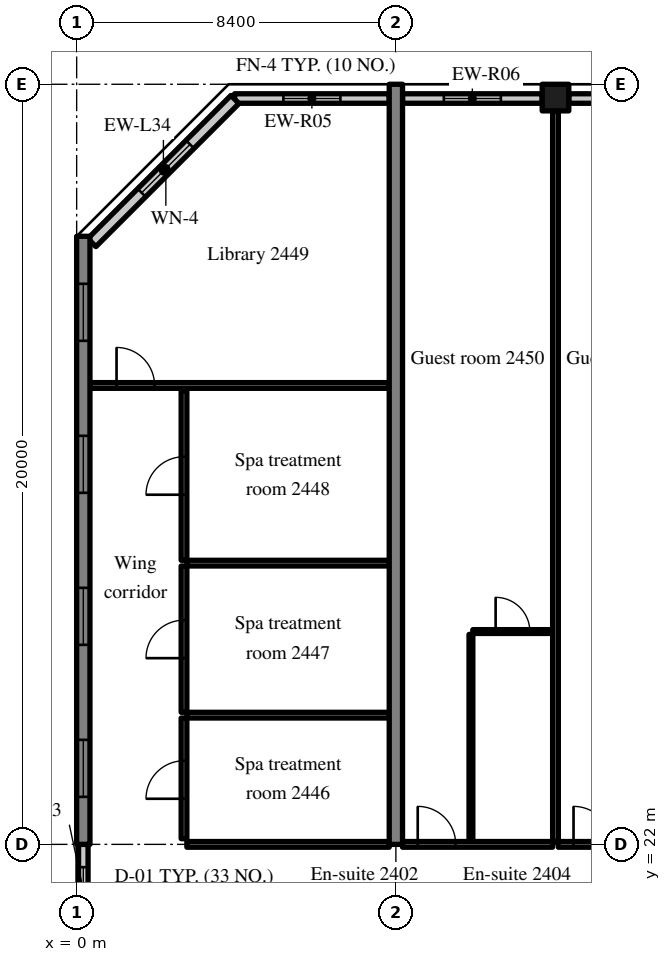
"""IFC4 building model, lengths in metres.
Left out: names, types, materials, properties, quantities, classifications, styles, units other than length and angle.
Written with IfcOpenShell. Run it as: python <this file> out.ifc"""

import sys

from ifc_helpers import new_model, si_unit, direction, frame, frame_2d, origin, origin_2d, place, context, subcontext, project, spatial, rectangle, extrude, source, transform, mapped, element, fill, save


model = new_model("IFC4")
c1 = context("Model", 3, precision=1e-05, world=origin(), true_north=direction((0.0, 1.0)))
c2 = subcontext(c1, "Body", "Model", "MODEL_VIEW")
j1 = project(units=[si_unit("LENGTHUNIT", "METRE"), si_unit("PLANEANGLEUNIT", "RADIAN")], contexts=[c1])
p1 = place(None, origin())
s1 = spatial("IfcSite", under=j1, at=p1, CompositionType="ELEMENT")
p2 = place(p1, origin())
s2 = spatial("IfcBuilding", under=s1, at=p2, CompositionType="ELEMENT")
p3 = place(p2, frame((0.0, 0.0, 102.8)))
s3 = spatial("IfcBuildingStorey", under=s2, at=p3, CompositionType="ELEMENT", Elevation=102.8)
m1 = source(origin(), c2, "Body", "SweptSolid", [
    extrude(rectangle(XDim=16.0, YDim=0.35, at=frame_2d((8.0, 0.0))), origin(), (0.0, 0.0, 1.0), 3.52),
])
p4 = place(p3, frame((0.175, 22.0, 0.0), z_axis=(0.0, 0.0, 1.0), x_axis=(0.0, 1.0, 0.0)))
e1 = element("IfcWall", 1, at=p4, inside=s3, PredefinedType="SHEAR", context=c2, shape_type="MappedRepresentation", body=[
    mapped(m1, transform((0.0, 0.0, 0.0), scale=1.0)),
])
m2 = source(origin(), c2, "Body", "SweptSolid", [
    extrude(rectangle(XDim=1.5, YDim=1.5, at=frame_2d((0.75, 0.75))), frame((0.0, 0.185, 0.0), z_axis=(0.0, -1.0, 0.0), x_axis=(1.0, 0.0, 0.0)), (0.0, 0.0, 1.0), 0.37),
])
p5 = place(p4, frame((1.25, 0.0, 0.9)))
e2 = element("IfcOpeningElement", 2, at=p5, cuts=e1, PredefinedType="OPENING", context=c2, shape_type="MappedRepresentation", body=[
    mapped(m2, transform((0.0, 0.0, 0.0), scale=1.0)),
])
p6 = place(p4, frame((5.25, 0.0, 0.9)))
e3 = element("IfcOpeningElement", 3, at=p6, cuts=e1, PredefinedType="OPENING", context=c2, shape_type="MappedRepresentation", body=[
    mapped(m2, transform((0.0, 0.0, 0.0), scale=1.0)),
])
p7 = place(p4, frame((9.25, 0.0, 0.9)))
e4 = element("IfcOpeningElement", 4, at=p7, cuts=e1, PredefinedType="OPENING", context=c2, shape_type="MappedRepresentation", body=[
    mapped(m2, transform((0.0, 0.0, 0.0), scale=1.0)),
])
p8 = place(p4, frame((13.25, 0.0, 0.9)))
e5 = element("IfcOpeningElement", 5, at=p8, cuts=e1, PredefinedType="OPENING", context=c2, shape_type="MappedRepresentation", body=[
    mapped(m2, transform((0.0, 0.0, 0.0), scale=1.0)),
])
m3 = source(origin(), c2, "Body", "SweptSolid", [
    extrude(rectangle(XDim=20.0, YDim=0.35, at=frame_2d((10.0, 0.0))), origin(), (0.0, 0.0, 1.0), 3.52),
])
p9 = place(p3, frame((8.4, 22.0, 0.0), z_axis=(0.0, 0.0, 1.0), x_axis=(0.0, 1.0, 0.0)))
e6 = element("IfcWall", 6, at=p9, inside=s3, PredefinedType="SHEAR", context=c2, shape_type="MappedRepresentation", body=[
    mapped(m3, transform((0.0, 0.0, 0.0), scale=1.0)),
])
m4 = source(origin(), c2, "Body", "SweptSolid", [
    extrude(rectangle(XDim=0.7, YDim=0.7, at=origin_2d()), origin(), (0.0, 0.0, 1.0), 3.52),
])
p10 = place(p3, frame((12.6, 41.65, 0.0), z_axis=(0.0, 0.0, 1.0), x_axis=(1.0, 0.0, 0.0)))
e7 = element("IfcColumn", 7, at=p10, inside=s3, PredefinedType="COLUMN", context=c2, shape_type="MappedRepresentation", body=[
    mapped(m4, transform((0.0, 0.0, 0.0), scale=1.0)),
])
m5 = source(origin(), c2, "Body", "SweptSolid", [
    extrude(rectangle(XDim=4.07, YDim=0.25, at=frame_2d((2.035, 0.0))), origin(), (0.0, 0.0, 1.0), 2.82),
])
p11 = place(p3, frame((8.225, 41.625, 0.0), z_axis=(0.0, 0.0, 1.0), x_axis=(-1.0, 0.0, 0.0)))
e8 = element("IfcWall", 8, at=p11, inside=s3, PredefinedType="SOLIDWALL", context=c2, shape_type="MappedRepresentation", body=[
    mapped(m5, transform((0.0, 0.0, 0.0), scale=1.0)),
])
m6 = source(origin(), c2, "Body", "SweptSolid", [
    extrude(rectangle(XDim=1.5, YDim=1.5, at=frame_2d((0.75, 0.75))), frame((0.0, 0.135, 0.0), z_axis=(0.0, -1.0, 0.0), x_axis=(1.0, 0.0, 0.0)), (0.0, 0.0, 1.0), 0.27),
])
p12 = place(p11, frame((1.285, 0.0, 0.9)))
e9 = element("IfcOpeningElement", 9, at=p12, cuts=e8, PredefinedType="OPENING", context=c2, shape_type="MappedRepresentation", body=[
    mapped(m6, transform((0.0, 0.0, 0.0), scale=1.0)),
])
m7 = source(origin(), c2, "Body", "SweptSolid", [
    extrude(rectangle(XDim=3.675, YDim=0.25, at=frame_2d((1.837, 0.0))), origin(), (0.0, 0.0, 1.0), 2.82),
])
p13 = place(p3, frame((12.25, 41.625, 0.0), z_axis=(0.0, 0.0, 1.0), x_axis=(-1.0, 0.0, 0.0)))
e10 = element("IfcWall", 10, at=p13, inside=s3, PredefinedType="SOLIDWALL", context=c2, shape_type="MappedRepresentation", body=[
    mapped(m7, transform((0.0, 0.0, 0.0), scale=1.0)),
])
p14 = place(p13, frame((1.087, 0.0, 0.9)))
e11 = element("IfcOpeningElement", 11, at=p14, cuts=e10, PredefinedType="OPENING", context=c2, shape_type="MappedRepresentation", body=[
    mapped(m6, transform((0.0, 0.0, 0.0), scale=1.0)),
])
p15 = place(p3, frame((16.625, 41.625, 0.0), z_axis=(0.0, 0.0, 1.0), x_axis=(-1.0, 0.0, 0.0)))
e12 = element("IfcWall", 12, at=p15, inside=s3, PredefinedType="SOLIDWALL", context=c2, shape_type="MappedRepresentation", body=[
    mapped(m7, transform((0.0, 0.0, 0.0), scale=1.0)),
])
p16 = place(p15, frame((1.087, 0.0, 0.9)))
e13 = element("IfcOpeningElement", 13, at=p16, cuts=e12, PredefinedType="OPENING", context=c2, shape_type="MappedRepresentation", body=[
    mapped(m6, transform((0.0, 0.0, 0.0), scale=1.0)),
])
m8 = source(origin(), c2, "Body", "SweptSolid", [
    extrude(rectangle(XDim=5.326, YDim=0.3, at=frame_2d((2.663, 0.0))), origin(), (0.0, 0.0, 1.0), 3.52),
])
p17 = place(p3, frame((4.166, 41.6, 0.0), z_axis=(0.0, 0.0, 1.0), x_axis=(-0.707106781187, -0.707106781187, 0.0)))
e14 = element("IfcWall", 14, at=p17, inside=s3, PredefinedType="SOLIDWALL", context=c2, shape_type="MappedRepresentation", body=[
    mapped(m8, transform((0.0, 0.0, 0.0), scale=1.0)),
])
m9 = source(origin(), c2, "Body", "SweptSolid", [
    extrude(rectangle(XDim=1.8, YDim=1.5, at=frame_2d((0.9, 0.75))), frame((0.0, 0.16, 0.0), z_axis=(0.0, -1.0, 0.0), x_axis=(1.0, 0.0, 0.0)), (0.0, 0.0, 1.0), 0.32),
])
p18 = place(p17, frame((1.672, 0.0, 0.9)))
e15 = element("IfcOpeningElement", 15, at=p18, cuts=e14, PredefinedType="OPENING", context=c2, shape_type="MappedRepresentation", body=[
    mapped(m9, transform((0.0, 0.0, 0.0), scale=1.0)),
])
m10 = source(origin(), c2, "Body", "SweptSolid", [
    extrude(rectangle(XDim=2.4, YDim=0.25, at=frame_2d((1.2, 0.0))), origin(), (0.0, 0.0, 1.0), 2.62),
])
p19 = place(p3, frame((0.175, 19.6, 0.0), z_axis=(0.0, 0.0, 1.0), x_axis=(0.0, 1.0, 0.0)))
e16 = element("IfcWall", 16, at=p19, inside=s3, PredefinedType="SOLIDWALL", context=c2, shape_type="MappedRepresentation", body=[
    mapped(m10, transform((0.0, 0.0, 0.0), scale=1.0)),
])
m11 = source(origin(), c2, "Body", "SweptSolid", [
    extrude(rectangle(XDim=1.2, YDim=1.5, at=frame_2d((0.6, 0.75))), frame((0.0, 0.135, 0.0), z_axis=(0.0, -1.0, 0.0), x_axis=(1.0, 0.0, 0.0)), (0.0, 0.0, 1.0), 0.27),
])
p20 = place(p19, frame((0.6, 0.0, 0.9)))
e17 = element("IfcOpeningElement", 17, at=p20, cuts=e16, PredefinedType="OPENING", context=c2, shape_type="MappedRepresentation", body=[
    mapped(m11, transform((0.0, 0.0, 0.0), scale=1.0)),
])
m12 = source(origin(), c2, "Body", "SweptSolid", [
    extrude(rectangle(XDim=5.325, YDim=0.15, at=frame_2d((2.663, 0.0))), origin(), (0.0, 0.0, 1.0), 2.82),
])
p21 = place(p3, frame((2.9, 22.0, 0.0), z_axis=(0.0, 0.0, 1.0), x_axis=(1.0, 0.0, 0.0)))
e18 = element("IfcWall", 18, at=p21, inside=s3, PredefinedType="PARTITIONING", context=c2, shape_type="MappedRepresentation", body=[
    mapped(m12, transform((0.0, 0.0, 0.0), scale=1.0)),
])
m13 = source(origin(), c2, "Body", "SweptSolid", [
    extrude(rectangle(XDim=3.175, YDim=0.15, at=frame_2d((1.587, 0.0))), origin(), (0.0, 0.0, 1.0), 3.52),
])
p22 = place(p3, frame((2.825, 22.15, 0.0), z_axis=(0.0, 0.0, 1.0), x_axis=(0.0, 1.0, 0.0)))
e19 = element("IfcWall", 19, at=p22, inside=s3, PredefinedType="PARTITIONING", context=c2, shape_type="MappedRepresentation", body=[
    mapped(m13, transform((0.0, 0.0, 0.0), scale=1.0)),
])
m14 = source(origin(), c2, "Body", "SweptSolid", [
    extrude(rectangle(XDim=1.0, YDim=2.1, at=frame_2d((0.5, 1.05))), frame((0.0, 0.085, 0.0), z_axis=(0.0, -1.0, 0.0), x_axis=(1.0, 0.0, 0.0)), (0.0, 0.0, 1.0), 0.17),
])
p23 = place(p22, frame((1.05, 0.0, 0.0)))
e20 = element("IfcOpeningElement", 20, at=p23, cuts=e19, PredefinedType="OPENING", context=c2, shape_type="MappedRepresentation", body=[
    mapped(m14, transform((0.0, 0.0, 0.0), scale=1.0)),
])
m15 = source(origin(), c2, "Body", "SweptSolid", [
    extrude(rectangle(XDim=5.325, YDim=0.15, at=frame_2d((2.663, 0.0))), origin(), (0.0, 0.0, 1.0), 3.52),
])
p24 = place(p3, frame((2.9, 25.4, 0.0), z_axis=(0.0, 0.0, 1.0), x_axis=(1.0, 0.0, 0.0)))
e21 = element("IfcWall", 21, at=p24, inside=s3, PredefinedType="PARTITIONING", context=c2, shape_type="MappedRepresentation", body=[
    mapped(m15, transform((0.0, 0.0, 0.0), scale=1.0)),
])
m16 = source(origin(), c2, "Body", "SweptSolid", [
    extrude(rectangle(XDim=3.85, YDim=0.15, at=frame_2d((1.925, 0.0))), origin(), (0.0, 0.0, 1.0), 3.52),
])
p25 = place(p3, frame((2.825, 25.475, 0.0), z_axis=(0.0, 0.0, 1.0), x_axis=(0.0, 1.0, 0.0)))
e22 = element("IfcWall", 22, at=p25, inside=s3, PredefinedType="PARTITIONING", context=c2, shape_type="MappedRepresentation", body=[
    mapped(m16, transform((0.0, 0.0, 0.0), scale=1.0)),
])
p26 = place(p25, frame((1.425, 0.0, 0.0)))
e23 = element("IfcOpeningElement", 23, at=p26, cuts=e22, PredefinedType="OPENING", context=c2, shape_type="MappedRepresentation", body=[
    mapped(m14, transform((0.0, 0.0, 0.0), scale=1.0)),
])
p27 = place(p3, frame((2.9, 29.4, 0.0), z_axis=(0.0, 0.0, 1.0), x_axis=(1.0, 0.0, 0.0)))
e24 = element("IfcWall", 24, at=p27, inside=s3, PredefinedType="PARTITIONING", context=c2, shape_type="MappedRepresentation", body=[
    mapped(m15, transform((0.0, 0.0, 0.0), scale=1.0)),
])
m17 = source(origin(), c2, "Body", "SweptSolid", [
    extrude(rectangle(XDim=4.45, YDim=0.15, at=frame_2d((2.225, 0.0))), origin(), (0.0, 0.0, 1.0), 3.52),
])
p28 = place(p3, frame((2.825, 29.475, 0.0), z_axis=(0.0, 0.0, 1.0), x_axis=(0.0, 1.0, 0.0)))
e25 = element("IfcWall", 25, at=p28, inside=s3, PredefinedType="PARTITIONING", context=c2, shape_type="MappedRepresentation", body=[
    mapped(m17, transform((0.0, 0.0, 0.0), scale=1.0)),
])
p29 = place(p28, frame((1.725, 0.0, 0.0)))
e26 = element("IfcOpeningElement", 26, at=p29, cuts=e25, PredefinedType="OPENING", context=c2, shape_type="MappedRepresentation", body=[
    mapped(m14, transform((0.0, 0.0, 0.0), scale=1.0)),
])
m18 = source(origin(), c2, "Body", "SweptSolid", [
    extrude(rectangle(XDim=7.875, YDim=0.15, at=frame_2d((3.938, 0.0))), origin(), (0.0, 0.0, 1.0), 3.52),
])
p30 = place(p3, frame((0.35, 34.075, 0.0), z_axis=(0.0, 0.0, 1.0), x_axis=(1.0, 0.0, 0.0)))
e27 = element("IfcWall", 27, at=p30, inside=s3, PredefinedType="PARTITIONING", context=c2, shape_type="MappedRepresentation", body=[
    mapped(m18, transform((0.0, 0.0, 0.0), scale=1.0)),
])
p31 = place(p30, frame((0.7, 0.0, 0.0)))
e28 = element("IfcOpeningElement", 28, at=p31, cuts=e27, PredefinedType="OPENING", context=c2, shape_type="MappedRepresentation", body=[
    mapped(m14, transform((0.0, 0.0, 0.0), scale=1.0)),
])
m19 = source(origin(), c2, "Body", "SweptSolid", [
    extrude(rectangle(XDim=5.45, YDim=0.1, at=frame_2d((2.725, 0.0))), origin(), (0.0, 0.0, 1.0), 3.52),
])
p32 = place(p3, frame((10.375, 22.075, 0.0), z_axis=(0.0, 0.0, 1.0), x_axis=(0.0, 1.0, 0.0)))
e29 = element("IfcWall", 29, at=p32, inside=s3, PredefinedType="PARTITIONING", context=c2, shape_type="MappedRepresentation", body=[
    mapped(m19, transform((0.0, 0.0, 0.0), scale=1.0)),
])
m20 = source(origin(), c2, "Body", "SweptSolid", [
    extrude(rectangle(XDim=2.1, YDim=0.1, at=frame_2d((1.05, 0.0))), origin(), (0.0, 0.0, 1.0), 3.52),
])
p33 = place(p3, frame((10.425, 27.6, 0.0), z_axis=(0.0, 0.0, 1.0), x_axis=(1.0, 0.0, 0.0)))
e30 = element("IfcWall", 30, at=p33, inside=s3, PredefinedType="PARTITIONING", context=c2, shape_type="MappedRepresentation", body=[
    mapped(m20, transform((0.0, 0.0, 0.0), scale=1.0)),
])
m21 = source(origin(), c2, "Body", "SweptSolid", [
    extrude(rectangle(XDim=0.9, YDim=2.1, at=frame_2d((0.45, 1.05))), frame((0.0, 0.06, 0.0), z_axis=(0.0, -1.0, 0.0), x_axis=(1.0, 0.0, 0.0)), (0.0, 0.0, 1.0), 0.12),
])
p34 = place(p33, frame((0.6, 0.0, 0.0)))
e31 = element("IfcOpeningElement", 31, at=p34, cuts=e30, PredefinedType="OPENING", context=c2, shape_type="MappedRepresentation", body=[
    mapped(m21, transform((0.0, 0.0, 0.0), scale=1.0)),
])
m22 = source(origin(), c2, "Body", "SweptSolid", [
    extrude(rectangle(XDim=3.95, YDim=0.15, at=frame_2d((1.975, 0.0))), origin(), (0.0, 0.0, 1.0), 2.82),
])
p35 = place(p3, frame((8.575, 22.0, 0.0), z_axis=(0.0, 0.0, 1.0), x_axis=(1.0, 0.0, 0.0)))
e32 = element("IfcWall", 32, at=p35, inside=s3, PredefinedType="PARTITIONING", context=c2, shape_type="MappedRepresentation", body=[
    mapped(m22, transform((0.0, 0.0, 0.0), scale=1.0)),
])
p36 = place(p35, frame((0.4, 0.0, 0.0)))
e33 = element("IfcOpeningElement", 33, at=p36, cuts=e32, PredefinedType="OPENING", context=c2, shape_type="MappedRepresentation", body=[
    mapped(m14, transform((0.0, 0.0, 0.0), scale=1.0)),
])
p37 = place(p3, frame((12.675, 22.0, 0.0), z_axis=(0.0, 0.0, 1.0), x_axis=(1.0, 0.0, 0.0)))
e34 = element("IfcWall", 34, at=p37, inside=s3, PredefinedType="PARTITIONING", context=c2, shape_type="MappedRepresentation", body=[
    mapped(m22, transform((0.0, 0.0, 0.0), scale=1.0)),
])
p38 = place(p37, frame((0.4, 0.0, 0.0)))
e35 = element("IfcOpeningElement", 35, at=p38, cuts=e34, PredefinedType="OPENING", context=c2, shape_type="MappedRepresentation", body=[
    mapped(m14, transform((0.0, 0.0, 0.0), scale=1.0)),
])
m23 = source(origin(), c2, "Body", "SweptSolid", [
    extrude(rectangle(XDim=19.225, YDim=0.15, at=frame_2d((9.613, 0.0))), origin(), (0.0, 0.0, 1.0), 3.52),
])
p39 = place(p3, frame((12.6, 22.075, 0.0), z_axis=(0.0, 0.0, 1.0), x_axis=(0.0, 1.0, 0.0)))
e36 = element("IfcWall", 36, at=p39, inside=s3, PredefinedType="PARTITIONING", context=c2, shape_type="MappedRepresentation", body=[
    mapped(m23, transform((0.0, 0.0, 0.0), scale=1.0)),
])
m24 = source(origin(), c2, "Body", "SweptSolid", [
    extrude(rectangle(XDim=1.5, YDim=1.5, at=frame_2d((0.75, 0.75))), frame((0.0, 0.03, 0.0), z_axis=(0.0, -1.0, 0.0), x_axis=(1.0, 0.0, 0.0)), (0.0, 0.0, 1.0), 0.06),
])
p40 = place(p12, origin())
e37 = element("IfcWindow", 37, at=p40, inside=s3, PartitioningType="SINGLE_PANEL", PredefinedType="WINDOW", context=c2, shape_type="MappedRepresentation", body=[
    mapped(m24, transform((0.0, 0.0, 0.0), scale=1.0)),
])
fill(e9, e37)
p41 = place(p14, origin())
e38 = element("IfcWindow", 38, at=p41, inside=s3, PartitioningType="SINGLE_PANEL", PredefinedType="WINDOW", context=c2, shape_type="MappedRepresentation", body=[
    mapped(m24, transform((0.0, 0.0, 0.0), scale=1.0)),
])
fill(e11, e38)
m25 = source(origin(), c2, "Body", "SweptSolid", [
    extrude(rectangle(XDim=1.8, YDim=1.5, at=frame_2d((0.9, 0.75))), frame((0.0, 0.03, 0.0), z_axis=(0.0, -1.0, 0.0), x_axis=(1.0, 0.0, 0.0)), (0.0, 0.0, 1.0), 0.06),
])
p42 = place(p18, origin())
e39 = element("IfcWindow", 39, at=p42, inside=s3, PartitioningType="SINGLE_PANEL", PredefinedType="WINDOW", context=c2, shape_type="MappedRepresentation", body=[
    mapped(m25, transform((0.0, 0.0, 0.0), scale=1.0)),
])
fill(e15, e39)
p43 = place(p5, origin())
e40 = element("IfcWindow", 40, at=p43, inside=s3, PartitioningType="SINGLE_PANEL", PredefinedType="WINDOW", context=c2, shape_type="MappedRepresentation", body=[
    mapped(m24, transform((0.0, 0.0, 0.0), scale=1.0)),
])
fill(e2, e40)
p44 = place(p6, origin())
e41 = element("IfcWindow", 41, at=p44, inside=s3, PartitioningType="SINGLE_PANEL", PredefinedType="WINDOW", context=c2, shape_type="MappedRepresentation", body=[
    mapped(m24, transform((0.0, 0.0, 0.0), scale=1.0)),
])
fill(e3, e41)
p45 = place(p7, origin())
e42 = element("IfcWindow", 42, at=p45, inside=s3, PartitioningType="SINGLE_PANEL", PredefinedType="WINDOW", context=c2, shape_type="MappedRepresentation", body=[
    mapped(m24, transform((0.0, 0.0, 0.0), scale=1.0)),
])
fill(e4, e42)
p46 = place(p8, origin())
e43 = element("IfcWindow", 43, at=p46, inside=s3, PartitioningType="SINGLE_PANEL", PredefinedType="WINDOW", context=c2, shape_type="MappedRepresentation", body=[
    mapped(m24, transform((0.0, 0.0, 0.0), scale=1.0)),
])
fill(e5, e43)
m26 = source(origin(), c2, "Body", "SweptSolid", [
    extrude(rectangle(XDim=1.2, YDim=1.5, at=frame_2d((0.6, 0.75))), frame((0.0, 0.03, 0.0), z_axis=(0.0, -1.0, 0.0), x_axis=(1.0, 0.0, 0.0)), (0.0, 0.0, 1.0), 0.06),
])
p47 = place(p20, origin())
e44 = element("IfcWindow", 44, at=p47, inside=s3, PartitioningType="SINGLE_PANEL", PredefinedType="WINDOW", context=c2, shape_type="MappedRepresentation", body=[
    mapped(m26, transform((0.0, 0.0, 0.0), scale=1.0)),
])
fill(e17, e44)
m27 = source(origin(), c2, "Body", "SweptSolid", [
    extrude(rectangle(XDim=1.0, YDim=2.1, at=frame_2d((0.5, 1.05))), frame((0.0, 0.025, 0.0), z_axis=(0.0, -1.0, 0.0), x_axis=(1.0, 0.0, 0.0)), (0.0, 0.0, 1.0), 0.05),
])
p48 = place(p23, origin())
e45 = element("IfcDoor", 45, at=p48, inside=s3, OperationType="SINGLE_SWING_LEFT", PredefinedType="DOOR", context=c2, shape_type="MappedRepresentation", body=[
    mapped(m27, transform((0.0, 0.0, 0.0), scale=1.0)),
])
fill(e20, e45)
p49 = place(p26, origin())
e46 = element("IfcDoor", 46, at=p49, inside=s3, OperationType="SINGLE_SWING_LEFT", PredefinedType="DOOR", context=c2, shape_type="MappedRepresentation", body=[
    mapped(m27, transform((0.0, 0.0, 0.0), scale=1.0)),
])
fill(e23, e46)
p50 = place(p29, origin())
e47 = element("IfcDoor", 47, at=p50, inside=s3, OperationType="SINGLE_SWING_LEFT", PredefinedType="DOOR", context=c2, shape_type="MappedRepresentation", body=[
    mapped(m27, transform((0.0, 0.0, 0.0), scale=1.0)),
])
fill(e26, e47)
p51 = place(p31, origin())
e48 = element("IfcDoor", 48, at=p51, inside=s3, OperationType="SINGLE_SWING_LEFT", PredefinedType="DOOR", context=c2, shape_type="MappedRepresentation", body=[
    mapped(m27, transform((0.0, 0.0, 0.0), scale=1.0)),
])
fill(e28, e48)
m28 = source(origin(), c2, "Body", "SweptSolid", [
    extrude(rectangle(XDim=0.9, YDim=2.1, at=frame_2d((0.45, 1.05))), frame((0.0, 0.025, 0.0), z_axis=(0.0, -1.0, 0.0), x_axis=(1.0, 0.0, 0.0)), (0.0, 0.0, 1.0), 0.05),
])
p52 = place(p34, origin())
e49 = element("IfcDoor", 49, at=p52, inside=s3, OperationType="SINGLE_SWING_LEFT", PredefinedType="DOOR", context=c2, shape_type="MappedRepresentation", body=[
    mapped(m28, transform((0.0, 0.0, 0.0), scale=1.0)),
])
fill(e31, e49)
p53 = place(p36, origin())
e50 = element("IfcDoor", 50, at=p53, inside=s3, OperationType="SINGLE_SWING_LEFT", PredefinedType="DOOR", context=c2, shape_type="MappedRepresentation", body=[
    mapped(m27, transform((0.0, 0.0, 0.0), scale=1.0)),
])
fill(e33, e50)
p54 = place(p38, origin())
e51 = element("IfcDoor", 51, at=p54, inside=s3, OperationType="SINGLE_SWING_LEFT", PredefinedType="DOOR", context=c2, shape_type="MappedRepresentation", body=[
    mapped(m27, transform((0.0, 0.0, 0.0), scale=1.0)),
])
fill(e35, e51)
save(model, sys.argv[1])
